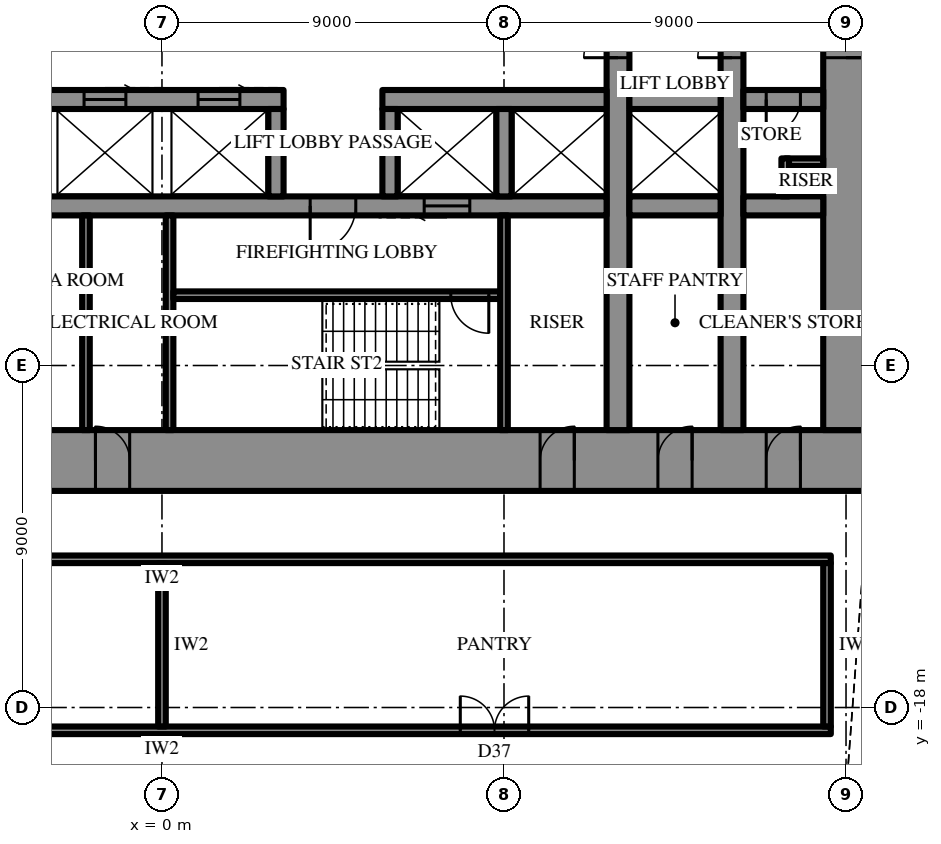
"""IFC4 building model, lengths in metres.
Left out: names, types, materials, properties, quantities, classifications, styles, units other than length and angle.
Written with IfcOpenShell. Run it as: python <this file> out.ifc"""

import sys

from ifc_helpers import new_model, si_unit, direction, frame, frame_2d, origin, place, context, subcontext, project, spatial, rectangle, extrude, element, fill, save


model = new_model("IFC4")
c1 = context("Model", 3, precision=1e-05, world=origin(), true_north=direction((0.0, 1.0)))
c2 = subcontext(c1, "Body", "Model", "MODEL_VIEW")
j1 = project(units=[si_unit("LENGTHUNIT", "METRE"), si_unit("PLANEANGLEUNIT", "RADIAN")], contexts=[c1])
p1 = place(None, origin())
s1 = spatial("IfcSite", under=j1, at=p1, CompositionType="ELEMENT")
p2 = place(p1, origin())
s2 = spatial("IfcBuilding", under=s1, at=p2, CompositionType="ELEMENT")
p3 = place(p2, frame((0.0, 0.0, 182.5)))
s3 = spatial("IfcBuildingStorey", under=s2, at=p3, CompositionType="ELEMENT", Elevation=182.5)
p4 = place(p3, frame((18.6, -11.5, 0.0), z_axis=(0.0, 0.0, 1.0), x_axis=(-1.0, 0.0, 0.0)))
e1 = element("IfcWall", 1, at=p4, inside=s3, PredefinedType="SHEAR", context=c2, shape_type="SweptSolid", body=[
    extrude(rectangle(XDim=37.2, YDim=1.6, at=frame_2d((18.6, 0.0))), origin(), (0.0, 0.0, 1.0), 4.2),
])
p5 = place(p4, frame((19.45, 0.0, 0.0)))
e2 = element("IfcOpeningElement", 2, at=p5, cuts=e1, PredefinedType="OPENING", context=c2, shape_type="SweptSolid", body=[
    extrude(rectangle(XDim=0.9, YDim=2.2, at=frame_2d((0.45, 1.1))), frame((0.0, 0.81, 0.0), z_axis=(0.0, -1.0, 0.0), x_axis=(1.0, 0.0, 0.0)), (0.0, 0.0, 1.0), 1.62),
])
p6 = place(p4, frame((22.45, 0.0, 0.0)))
e3 = element("IfcOpeningElement", 3, at=p6, cuts=e1, PredefinedType="OPENING", context=c2, shape_type="SweptSolid", body=[
    extrude(rectangle(XDim=0.9, YDim=2.2, at=frame_2d((0.45, 1.1))), frame((0.0, 0.81, 0.0), z_axis=(0.0, -1.0, 0.0), x_axis=(1.0, 0.0, 0.0)), (0.0, 0.0, 1.0), 1.62),
])
p7 = place(p4, frame((25.5, 0.0, 0.0)))
e4 = element("IfcOpeningElement", 4, at=p7, cuts=e1, PredefinedType="OPENING", context=c2, shape_type="SweptSolid", body=[
    extrude(rectangle(XDim=1.0, YDim=2.2, at=frame_2d((0.5, 1.1))), frame((0.0, 0.81, 0.0), z_axis=(0.0, -1.0, 0.0), x_axis=(1.0, 0.0, 0.0)), (0.0, 0.0, 1.0), 1.62),
])
p8 = place(p4, frame((1.8, 0.0, 0.0)))
e5 = element("IfcOpeningElement", 5, at=p8, cuts=e1, PredefinedType="OPENING", context=c2, shape_type="SweptSolid", body=[
    extrude(rectangle(XDim=0.9, YDim=2.2, at=frame_2d((0.45, 1.1))), frame((0.0, 0.81, 0.0), z_axis=(0.0, -1.0, 0.0), x_axis=(1.0, 0.0, 0.0)), (0.0, 0.0, 1.0), 1.62),
])
p9 = place(p4, frame((4.65, 0.0, 0.0)))
e6 = element("IfcOpeningElement", 6, at=p9, cuts=e1, PredefinedType="OPENING", context=c2, shape_type="SweptSolid", body=[
    extrude(rectangle(XDim=0.9, YDim=2.2, at=frame_2d((0.45, 1.1))), frame((0.0, 0.81, 0.0), z_axis=(0.0, -1.0, 0.0), x_axis=(1.0, 0.0, 0.0)), (0.0, 0.0, 1.0), 1.62),
])
p10 = place(p4, frame((7.75, 0.0, 0.0)))
e7 = element("IfcOpeningElement", 7, at=p10, cuts=e1, PredefinedType="OPENING", context=c2, shape_type="SweptSolid", body=[
    extrude(rectangle(XDim=0.9, YDim=2.2, at=frame_2d((0.45, 1.1))), frame((0.0, 0.81, 0.0), z_axis=(0.0, -1.0, 0.0), x_axis=(1.0, 0.0, 0.0)), (0.0, 0.0, 1.0), 1.62),
])
p11 = place(p4, frame((28.55, 0.0, 0.0)))
e8 = element("IfcOpeningElement", 8, at=p11, cuts=e1, PredefinedType="OPENING", context=c2, shape_type="SweptSolid", body=[
    extrude(rectangle(XDim=0.9, YDim=2.2, at=frame_2d((0.45, 1.1))), frame((0.0, 0.81, 0.0), z_axis=(0.0, -1.0, 0.0), x_axis=(1.0, 0.0, 0.0)), (0.0, 0.0, 1.0), 1.62),
])
p12 = place(p4, frame((31.65, 0.0, 0.0)))
e9 = element("IfcOpeningElement", 9, at=p12, cuts=e1, PredefinedType="OPENING", context=c2, shape_type="SweptSolid", body=[
    extrude(rectangle(XDim=0.9, YDim=2.2, at=frame_2d((0.45, 1.1))), frame((0.0, 0.81, 0.0), z_axis=(0.0, -1.0, 0.0), x_axis=(1.0, 0.0, 0.0)), (0.0, 0.0, 1.0), 1.62),
])
p13 = place(p4, frame((34.5, 0.0, 0.0)))
e10 = element("IfcOpeningElement", 10, at=p13, cuts=e1, PredefinedType="OPENING", context=c2, shape_type="SweptSolid", body=[
    extrude(rectangle(XDim=0.9, YDim=2.2, at=frame_2d((0.45, 1.1))), frame((0.0, 0.81, 0.0), z_axis=(0.0, -1.0, 0.0), x_axis=(1.0, 0.0, 0.0)), (0.0, 0.0, 1.0), 1.62),
])
p14 = place(p3, frame((18.0, -10.7, 0.0), z_axis=(0.0, 0.0, 1.0), x_axis=(0.0, 1.0, 0.0)))
e11 = element("IfcWall", 11, at=p14, inside=s3, PredefinedType="SHEAR", context=c2, shape_type="SweptSolid", body=[
    extrude(rectangle(XDim=21.4, YDim=1.2, at=frame_2d((10.7, 0.0))), origin(), (0.0, 0.0, 1.0), 4.2),
])
p15 = place(p14, frame((9.8, 0.0, 0.0)))
e12 = element("IfcOpeningElement", 12, at=p15, cuts=e11, PredefinedType="OPENING", context=c2, shape_type="SweptSolid", body=[
    extrude(rectangle(XDim=1.8, YDim=2.4, at=frame_2d((0.9, 1.2))), frame((0.0, 0.61, 0.0), z_axis=(0.0, -1.0, 0.0), x_axis=(1.0, 0.0, 0.0)), (0.0, 0.0, 1.0), 1.22),
])
p16 = place(p3, frame((12.0, -10.7, 0.0), z_axis=(0.0, 0.0, 1.0), x_axis=(0.0, 1.0, 0.0)))
e13 = element("IfcWall", 13, at=p16, inside=s3, PredefinedType="SHEAR", context=c2, shape_type="SweptSolid", body=[
    extrude(rectangle(XDim=21.4, YDim=0.6, at=frame_2d((10.7, 0.0))), origin(), (0.0, 0.0, 1.0), 4.2),
])
p17 = place(p16, frame((9.8, 0.0, 0.0)))
e14 = element("IfcOpeningElement", 14, at=p17, cuts=e13, PredefinedType="OPENING", context=c2, shape_type="SweptSolid", body=[
    extrude(rectangle(XDim=1.8, YDim=2.4, at=frame_2d((0.9, 1.2))), frame((0.0, 0.31, 0.0), z_axis=(0.0, -1.0, 0.0), x_axis=(1.0, 0.0, 0.0)), (0.0, 0.0, 1.0), 0.62),
])
p18 = place(p3, frame((15.0, -10.7, 0.0), z_axis=(0.0, 0.0, 1.0), x_axis=(0.0, 1.0, 0.0)))
e15 = element("IfcWall", 15, at=p18, inside=s3, PredefinedType="SHEAR", context=c2, shape_type="SweptSolid", body=[
    extrude(rectangle(XDim=21.4, YDim=0.6, at=frame_2d((10.7, 0.0))), origin(), (0.0, 0.0, 1.0), 4.2),
])
p19 = place(p18, frame((9.8, 0.0, 0.0)))
e16 = element("IfcOpeningElement", 16, at=p19, cuts=e15, PredefinedType="OPENING", context=c2, shape_type="SweptSolid", body=[
    extrude(rectangle(XDim=1.8, YDim=2.4, at=frame_2d((0.9, 1.2))), frame((0.0, 0.31, 0.0), z_axis=(0.0, -1.0, 0.0), x_axis=(1.0, 0.0, 0.0)), (0.0, 0.0, 1.0), 0.62),
])
p20 = place(p3, frame((17.4, -2.0, 0.0), z_axis=(0.0, 0.0, 1.0), x_axis=(-1.0, 0.0, 0.0)))
e17 = element("IfcWall", 17, at=p20, inside=s3, PredefinedType="SHEAR", context=c2, shape_type="SweptSolid", body=[
    extrude(rectangle(XDim=2.1, YDim=0.5, at=frame_2d((1.05, 0.0))), origin(), (0.0, 0.0, 1.0), 4.2),
])
p21 = place(p20, frame((0.6, 0.0, 0.0)))
e18 = element("IfcOpeningElement", 18, at=p21, cuts=e17, PredefinedType="OPENING", context=c2, shape_type="SweptSolid", body=[
    extrude(rectangle(XDim=0.9, YDim=2.2, at=frame_2d((0.45, 1.1))), frame((0.0, 0.26, 0.0), z_axis=(0.0, -1.0, 0.0), x_axis=(1.0, 0.0, 0.0)), (0.0, 0.0, 1.0), 0.52),
])
p22 = place(p3, frame((14.7, -2.0, 0.0), z_axis=(0.0, 0.0, 1.0), x_axis=(-1.0, 0.0, 0.0)))
e19 = element("IfcWall", 19, at=p22, inside=s3, PredefinedType="SHEAR", context=c2, shape_type="SweptSolid", body=[
    extrude(rectangle(XDim=2.4, YDim=0.5, at=frame_2d((1.2, 0.0))), origin(), (0.0, 0.0, 1.0), 4.2),
])
p23 = place(p3, frame((11.7, -2.0, 0.0), z_axis=(0.0, 0.0, 1.0), x_axis=(-1.0, 0.0, 0.0)))
e20 = element("IfcWall", 20, at=p23, inside=s3, PredefinedType="SHEAR", context=c2, shape_type="SweptSolid", body=[
    extrude(rectangle(XDim=5.9, YDim=0.5, at=frame_2d((2.95, 0.0))), origin(), (0.0, 0.0, 1.0), 4.2),
])
p24 = place(p3, frame((3.2, -2.0, 0.0), z_axis=(0.0, 0.0, 1.0), x_axis=(-1.0, 0.0, 0.0)))
e21 = element("IfcWall", 21, at=p24, inside=s3, PredefinedType="SHEAR", context=c2, shape_type="SweptSolid", body=[
    extrude(rectangle(XDim=14.9, YDim=0.5, at=frame_2d((7.45, 0.0))), origin(), (0.0, 0.0, 1.0), 4.2),
])
p25 = place(p24, frame((1.15, 0.0, 0.0)))
e22 = element("IfcOpeningElement", 22, at=p25, cuts=e21, PredefinedType="OPENING", context=c2, shape_type="SweptSolid", body=[
    extrude(rectangle(XDim=1.1, YDim=2.2, at=frame_2d((0.55, 1.1))), frame((0.0, 0.26, 0.0), z_axis=(0.0, -1.0, 0.0), x_axis=(1.0, 0.0, 0.0)), (0.0, 0.0, 1.0), 0.52),
])
p26 = place(p24, frame((4.15, 0.0, 0.0)))
e23 = element("IfcOpeningElement", 23, at=p26, cuts=e21, PredefinedType="OPENING", context=c2, shape_type="SweptSolid", body=[
    extrude(rectangle(XDim=1.1, YDim=2.2, at=frame_2d((0.55, 1.1))), frame((0.0, 0.26, 0.0), z_axis=(0.0, -1.0, 0.0), x_axis=(1.0, 0.0, 0.0)), (0.0, 0.0, 1.0), 0.52),
])
p27 = place(p24, frame((7.15, 0.0, 0.0)))
e24 = element("IfcOpeningElement", 24, at=p27, cuts=e21, PredefinedType="OPENING", context=c2, shape_type="SweptSolid", body=[
    extrude(rectangle(XDim=1.1, YDim=2.2, at=frame_2d((0.55, 1.1))), frame((0.0, 0.26, 0.0), z_axis=(0.0, -1.0, 0.0), x_axis=(1.0, 0.0, 0.0)), (0.0, 0.0, 1.0), 0.52),
])
p28 = place(p24, frame((10.15, 0.0, 0.0)))
e25 = element("IfcOpeningElement", 25, at=p28, cuts=e21, PredefinedType="OPENING", context=c2, shape_type="SweptSolid", body=[
    extrude(rectangle(XDim=1.1, YDim=2.2, at=frame_2d((0.55, 1.1))), frame((0.0, 0.26, 0.0), z_axis=(0.0, -1.0, 0.0), x_axis=(1.0, 0.0, 0.0)), (0.0, 0.0, 1.0), 0.52),
])
p29 = place(p3, frame((17.4, -4.8, 0.0), z_axis=(0.0, 0.0, 1.0), x_axis=(-1.0, 0.0, 0.0)))
e26 = element("IfcWall", 26, at=p29, inside=s3, PredefinedType="SHEAR", context=c2, shape_type="SweptSolid", body=[
    extrude(rectangle(XDim=2.1, YDim=0.5, at=frame_2d((1.05, 0.0))), origin(), (0.0, 0.0, 1.0), 4.2),
])
p30 = place(p3, frame((14.7, -4.8, 0.0), z_axis=(0.0, 0.0, 1.0), x_axis=(-1.0, 0.0, 0.0)))
e27 = element("IfcWall", 27, at=p30, inside=s3, PredefinedType="SHEAR", context=c2, shape_type="SweptSolid", body=[
    extrude(rectangle(XDim=2.4, YDim=0.5, at=frame_2d((1.2, 0.0))), origin(), (0.0, 0.0, 1.0), 4.2),
])
p31 = place(p3, frame((11.7, -4.8, 0.0), z_axis=(0.0, 0.0, 1.0), x_axis=(-1.0, 0.0, 0.0)))
e28 = element("IfcWall", 28, at=p31, inside=s3, PredefinedType="SHEAR", context=c2, shape_type="SweptSolid", body=[
    extrude(rectangle(XDim=23.4, YDim=0.5, at=frame_2d((11.7, 0.0))), origin(), (0.0, 0.0, 1.0), 4.2),
])
p32 = place(p31, frame((6.6, 0.0, 0.0)))
e29 = element("IfcOpeningElement", 29, at=p32, cuts=e28, PredefinedType="OPENING", context=c2, shape_type="SweptSolid", body=[
    extrude(rectangle(XDim=1.2, YDim=2.2, at=frame_2d((0.6, 1.1))), frame((0.0, 0.26, 0.0), z_axis=(0.0, -1.0, 0.0), x_axis=(1.0, 0.0, 0.0)), (0.0, 0.0, 1.0), 0.52),
])
p33 = place(p31, frame((3.6, 0.0, 0.0)))
e30 = element("IfcOpeningElement", 30, at=p33, cuts=e28, PredefinedType="OPENING", context=c2, shape_type="SweptSolid", body=[
    extrude(rectangle(XDim=1.2, YDim=2.2, at=frame_2d((0.6, 1.1))), frame((0.0, 0.26, 0.0), z_axis=(0.0, -1.0, 0.0), x_axis=(1.0, 0.0, 0.0)), (0.0, 0.0, 1.0), 0.52),
])
for number, where, z_axis, x_axis in (
    (31, (9.0, -2.25, 0.0), (0.0, 0.0, 1.0), (0.0, -1.0, 0.0)),
    (32, (6.0, -2.25, 0.0), (0.0, 0.0, 1.0), (0.0, -1.0, 0.0)),
    (33, (3.0, -2.25, 0.0), (0.0, 0.0, 1.0), (0.0, -1.0, 0.0)),
):
    element("IfcWall", number, at=place(p3, frame(where, z_axis=z_axis, x_axis=x_axis)), inside=s3, PredefinedType="SHEAR", context=c2, shape_type="SweptSolid", body=[
        extrude(rectangle(XDim=2.3, YDim=0.4, at=frame_2d((1.15, 0.0))), origin(), (0.0, 0.0, 1.0), 4.2),
    ])
p34 = place(p3, frame((0.2, -5.05, 0.0), z_axis=(0.0, 0.0, 1.0), x_axis=(0.0, -1.0, 0.0)))
e34 = element("IfcWall", 34, at=p34, inside=s3, PredefinedType="SHEAR", context=c2, shape_type="SweptSolid", body=[
    extrude(rectangle(XDim=5.65, YDim=0.2, at=frame_2d((2.825, 0.0))), origin(), (0.0, 0.0, 1.0), 4.2),
])
p35 = place(p3, frame((8.9, -7.15, 0.0), z_axis=(0.0, 0.0, 1.0), x_axis=(-1.0, 0.0, 0.0)))
e35 = element("IfcWall", 35, at=p35, inside=s3, PredefinedType="SHEAR", context=c2, shape_type="SweptSolid", body=[
    extrude(rectangle(XDim=8.6, YDim=0.2, at=frame_2d((4.3, 0.0))), origin(), (0.0, 0.0, 1.0), 4.2),
])
p36 = place(p35, frame((0.3, 0.0, 0.0)))
e36 = element("IfcOpeningElement", 36, at=p36, cuts=e35, PredefinedType="OPENING", context=c2, shape_type="SweptSolid", body=[
    extrude(rectangle(XDim=1.0, YDim=2.2, at=frame_2d((0.5, 1.1))), frame((0.0, 0.11, 0.0), z_axis=(0.0, -1.0, 0.0), x_axis=(1.0, 0.0, 0.0)), (0.0, 0.0, 1.0), 0.22),
])
for number, where, z_axis, x_axis in (
    (37, (9.0, -5.05, 0.0), (0.0, 0.0, 1.0), (0.0, -1.0, 0.0)),
    (38, (-2.0, -5.05, 0.0), (0.0, 0.0, 1.0), (0.0, -1.0, 0.0)),
):
    element("IfcWall", number, at=place(p3, frame(where, z_axis=z_axis, x_axis=x_axis)), inside=s3, PredefinedType="PARTITIONING", context=c2, shape_type="SweptSolid", body=[
        extrude(rectangle(XDim=5.65, YDim=0.2, at=frame_2d((2.825, 0.0))), origin(), (0.0, 0.0, 1.0), 4.0),
    ])
for number, where, z_axis, x_axis in (
    (39, (17.4, -3.65, 0.0), (0.0, 0.0, 1.0), (-1.0, 0.0, 0.0)),
    (40, (16.4, -3.55, 0.0), (0.0, 0.0, 1.0), (0.0, -1.0, 0.0)),
):
    element("IfcWall", number, at=place(p3, frame(where, z_axis=z_axis, x_axis=x_axis)), inside=s3, PredefinedType="PARTITIONING", context=c2, shape_type="SweptSolid", body=[
        extrude(rectangle(XDim=1.0, YDim=0.2, at=frame_2d((0.5, 0.0))), origin(), (0.0, 0.0, 1.0), 4.0),
    ])
p37 = place(p3, frame((17.6, -14.1, 0.0), z_axis=(0.0, 0.0, 1.0), x_axis=(-1.0, 0.0, 0.0)))
e41 = element("IfcWall", 41, at=p37, inside=s3, PredefinedType="PARTITIONING", context=c2, shape_type="SweptSolid", body=[
    extrude(rectangle(XDim=35.2, YDim=0.2, at=frame_2d((17.6, 0.0))), origin(), (0.0, 0.0, 1.0), 4.0),
])
p38 = place(p3, frame((17.6, -18.6, 0.0), z_axis=(0.0, 0.0, 1.0), x_axis=(-1.0, 0.0, 0.0)))
e42 = element("IfcWall", 42, at=p38, inside=s3, PredefinedType="PARTITIONING", context=c2, shape_type="SweptSolid", body=[
    extrude(rectangle(XDim=35.2, YDim=0.2, at=frame_2d((17.6, 0.0))), origin(), (0.0, 0.0, 1.0), 4.0),
])
p39 = place(p38, frame((7.95, 0.0, 0.0)))
e43 = element("IfcOpeningElement", 43, at=p39, cuts=e42, PredefinedType="OPENING", context=c2, shape_type="SweptSolid", body=[
    extrude(rectangle(XDim=1.8, YDim=2.4, at=frame_2d((0.9, 1.2))), frame((0.0, 0.11, 0.0), z_axis=(0.0, -1.0, 0.0), x_axis=(1.0, 0.0, 0.0)), (0.0, 0.0, 1.0), 0.22),
])
p40 = place(p38, frame((25.45, 0.0, 0.0)))
e44 = element("IfcOpeningElement", 44, at=p40, cuts=e42, PredefinedType="OPENING", context=c2, shape_type="SweptSolid", body=[
    extrude(rectangle(XDim=1.8, YDim=2.4, at=frame_2d((0.9, 1.2))), frame((0.0, 0.11, 0.0), z_axis=(0.0, -1.0, 0.0), x_axis=(1.0, 0.0, 0.0)), (0.0, 0.0, 1.0), 0.22),
])
p41 = place(p3, frame((17.5, -14.2, 0.0), z_axis=(0.0, 0.0, 1.0), x_axis=(0.0, -1.0, 0.0)))
e45 = element("IfcWall", 45, at=p41, inside=s3, PredefinedType="PARTITIONING", context=c2, shape_type="SweptSolid", body=[
    extrude(rectangle(XDim=4.3, YDim=0.2, at=frame_2d((2.15, 0.0))), origin(), (0.0, 0.0, 1.0), 4.0),
])
p42 = place(p3, frame((0.0, -14.2, 0.0), z_axis=(0.0, 0.0, 1.0), x_axis=(0.0, -1.0, 0.0)))
e46 = element("IfcWall", 46, at=p42, inside=s3, PredefinedType="PARTITIONING", context=c2, shape_type="SweptSolid", body=[
    extrude(rectangle(XDim=4.3, YDim=0.2, at=frame_2d((2.15, 0.0))), origin(), (0.0, 0.0, 1.0), 2.992),
])
p43 = place(p15, frame((1.8, 0.0, 0.0), z_axis=(0.0, 0.0, 1.0), x_axis=(-1.0, 0.0, 0.0)))
e47 = element("IfcDoor", 47, at=p43, inside=s3, OperationType="DOUBLE_DOOR_SINGLE_SWING", PredefinedType="DOOR", context=c2, shape_type="SweptSolid", body=[
    extrude(rectangle(XDim=1.8, YDim=2.4, at=frame_2d((0.9, 1.2))), frame((0.0, 0.025, 0.0), z_axis=(0.0, -1.0, 0.0), x_axis=(1.0, 0.0, 0.0)), (0.0, 0.0, 1.0), 0.05),
])
fill(e12, e47)
p44 = place(p32, origin())
e48 = element("IfcDoor", 48, at=p44, inside=s3, OperationType="SINGLE_SWING_LEFT", PredefinedType="DOOR", context=c2, shape_type="SweptSolid", body=[
    extrude(rectangle(XDim=1.2, YDim=2.2, at=frame_2d((0.6, 1.1))), frame((0.0, 0.025, 0.0), z_axis=(0.0, -1.0, 0.0), x_axis=(1.0, 0.0, 0.0)), (0.0, 0.0, 1.0), 0.05),
])
fill(e29, e48)
p45 = place(p36, origin())
e49 = element("IfcDoor", 49, at=p45, inside=s3, OperationType="SINGLE_SWING_RIGHT", PredefinedType="DOOR", context=c2, shape_type="SweptSolid", body=[
    extrude(rectangle(XDim=1.0, YDim=2.2, at=frame_2d((0.5, 1.1))), frame((0.0, 0.025, 0.0), z_axis=(0.0, -1.0, 0.0), x_axis=(1.0, 0.0, 0.0)), (0.0, 0.0, 1.0), 0.05),
])
fill(e36, e49)
p46 = place(p5, frame((0.9, 0.0, 0.0), z_axis=(0.0, 0.0, 1.0), x_axis=(-1.0, 0.0, 0.0)))
e50 = element("IfcDoor", 50, at=p46, inside=s3, OperationType="SINGLE_SWING_RIGHT", PredefinedType="DOOR", context=c2, shape_type="SweptSolid", body=[
    extrude(rectangle(XDim=0.9, YDim=2.2, at=frame_2d((0.45, 1.1))), frame((0.0, 0.025, 0.0), z_axis=(0.0, -1.0, 0.0), x_axis=(1.0, 0.0, 0.0)), (0.0, 0.0, 1.0), 0.05),
])
fill(e2, e50)
p47 = place(p8, frame((0.9, 0.0, 0.0), z_axis=(0.0, 0.0, 1.0), x_axis=(-1.0, 0.0, 0.0)))
e51 = element("IfcDoor", 51, at=p47, inside=s3, OperationType="SINGLE_SWING_LEFT", PredefinedType="DOOR", context=c2, shape_type="SweptSolid", body=[
    extrude(rectangle(XDim=0.9, YDim=2.2, at=frame_2d((0.45, 1.1))), frame((0.0, 0.025, 0.0), z_axis=(0.0, -1.0, 0.0), x_axis=(1.0, 0.0, 0.0)), (0.0, 0.0, 1.0), 0.05),
])
fill(e5, e51)
p48 = place(p9, frame((0.9, 0.0, 0.0), z_axis=(0.0, 0.0, 1.0), x_axis=(-1.0, 0.0, 0.0)))
e52 = element("IfcDoor", 52, at=p48, inside=s3, OperationType="SINGLE_SWING_LEFT", PredefinedType="DOOR", context=c2, shape_type="SweptSolid", body=[
    extrude(rectangle(XDim=0.9, YDim=2.2, at=frame_2d((0.45, 1.1))), frame((0.0, 0.025, 0.0), z_axis=(0.0, -1.0, 0.0), x_axis=(1.0, 0.0, 0.0)), (0.0, 0.0, 1.0), 0.05),
])
fill(e6, e52)
p49 = place(p10, frame((0.9, 0.0, 0.0), z_axis=(0.0, 0.0, 1.0), x_axis=(-1.0, 0.0, 0.0)))
e53 = element("IfcDoor", 53, at=p49, inside=s3, OperationType="SINGLE_SWING_LEFT", PredefinedType="DOOR", context=c2, shape_type="SweptSolid", body=[
    extrude(rectangle(XDim=0.9, YDim=2.2, at=frame_2d((0.45, 1.1))), frame((0.0, 0.025, 0.0), z_axis=(0.0, -1.0, 0.0), x_axis=(1.0, 0.0, 0.0)), (0.0, 0.0, 1.0), 0.05),
])
fill(e7, e53)
p50 = place(p21, origin())
e54 = element("IfcDoor", 54, at=p50, inside=s3, OperationType="SINGLE_SWING_LEFT", PredefinedType="DOOR", context=c2, shape_type="SweptSolid", body=[
    extrude(rectangle(XDim=0.9, YDim=2.2, at=frame_2d((0.45, 1.1))), frame((0.0, 0.025, 0.0), z_axis=(0.0, -1.0, 0.0), x_axis=(1.0, 0.0, 0.0)), (0.0, 0.0, 1.0), 0.05),
])
fill(e18, e54)
p51 = place(p17, origin())
e55 = element("IfcDoor", 55, at=p51, inside=s3, OperationType="DOUBLE_DOOR_SINGLE_SWING", PredefinedType="DOOR", context=c2, shape_type="SweptSolid", body=[
    extrude(rectangle(XDim=1.8, YDim=2.4, at=frame_2d((0.9, 1.2))), frame((0.0, 0.025, 0.0), z_axis=(0.0, -1.0, 0.0), x_axis=(1.0, 0.0, 0.0)), (0.0, 0.0, 1.0), 0.05),
])
fill(e14, e55)
p52 = place(p19, origin())
e56 = element("IfcDoor", 56, at=p52, inside=s3, OperationType="DOUBLE_DOOR_SINGLE_SWING", PredefinedType="DOOR", context=c2, shape_type="SweptSolid", body=[
    extrude(rectangle(XDim=1.8, YDim=2.4, at=frame_2d((0.9, 1.2))), frame((0.0, 0.025, 0.0), z_axis=(0.0, -1.0, 0.0), x_axis=(1.0, 0.0, 0.0)), (0.0, 0.0, 1.0), 0.05),
])
fill(e16, e56)
p53 = place(p33, origin())
e57 = element("IfcDoor", 57, at=p53, inside=s3, OperationType="SLIDING_TO_LEFT", PredefinedType="DOOR", context=c2, shape_type="SweptSolid", body=[
    extrude(rectangle(XDim=1.2, YDim=2.2, at=frame_2d((0.6, 1.1))), frame((0.0, 0.025, 0.0), z_axis=(0.0, -1.0, 0.0), x_axis=(1.0, 0.0, 0.0)), (0.0, 0.0, 1.0), 0.05),
])
fill(e30, e57)
p54 = place(p25, frame((1.1, 0.0, 0.0), z_axis=(0.0, 0.0, 1.0), x_axis=(-1.0, 0.0, 0.0)))
e58 = element("IfcDoor", 58, at=p54, inside=s3, OperationType="SLIDING_TO_LEFT", PredefinedType="DOOR", context=c2, shape_type="SweptSolid", body=[
    extrude(rectangle(XDim=1.1, YDim=2.2, at=frame_2d((0.55, 1.1))), frame((0.0, 0.025, 0.0), z_axis=(0.0, -1.0, 0.0), x_axis=(1.0, 0.0, 0.0)), (0.0, 0.0, 1.0), 0.05),
])
fill(e22, e58)
p55 = place(p26, frame((1.1, 0.0, 0.0), z_axis=(0.0, 0.0, 1.0), x_axis=(-1.0, 0.0, 0.0)))
e59 = element("IfcDoor", 59, at=p55, inside=s3, OperationType="SLIDING_TO_LEFT", PredefinedType="DOOR", context=c2, shape_type="SweptSolid", body=[
    extrude(rectangle(XDim=1.1, YDim=2.2, at=frame_2d((0.55, 1.1))), frame((0.0, 0.025, 0.0), z_axis=(0.0, -1.0, 0.0), x_axis=(1.0, 0.0, 0.0)), (0.0, 0.0, 1.0), 0.05),
])
fill(e23, e59)
p56 = place(p39, frame((1.8, 0.0, 0.0), z_axis=(0.0, 0.0, 1.0), x_axis=(-1.0, 0.0, 0.0)))
e60 = element("IfcDoor", 60, at=p56, inside=s3, OperationType="DOUBLE_DOOR_SINGLE_SWING", PredefinedType="DOOR", context=c2, shape_type="SweptSolid", body=[
    extrude(rectangle(XDim=1.8, YDim=2.4, at=frame_2d((0.9, 1.2))), frame((0.0, 0.025, 0.0), z_axis=(0.0, -1.0, 0.0), x_axis=(1.0, 0.0, 0.0)), (0.0, 0.0, 1.0), 0.05),
])
fill(e43, e60)
save(model, sys.argv[1])
